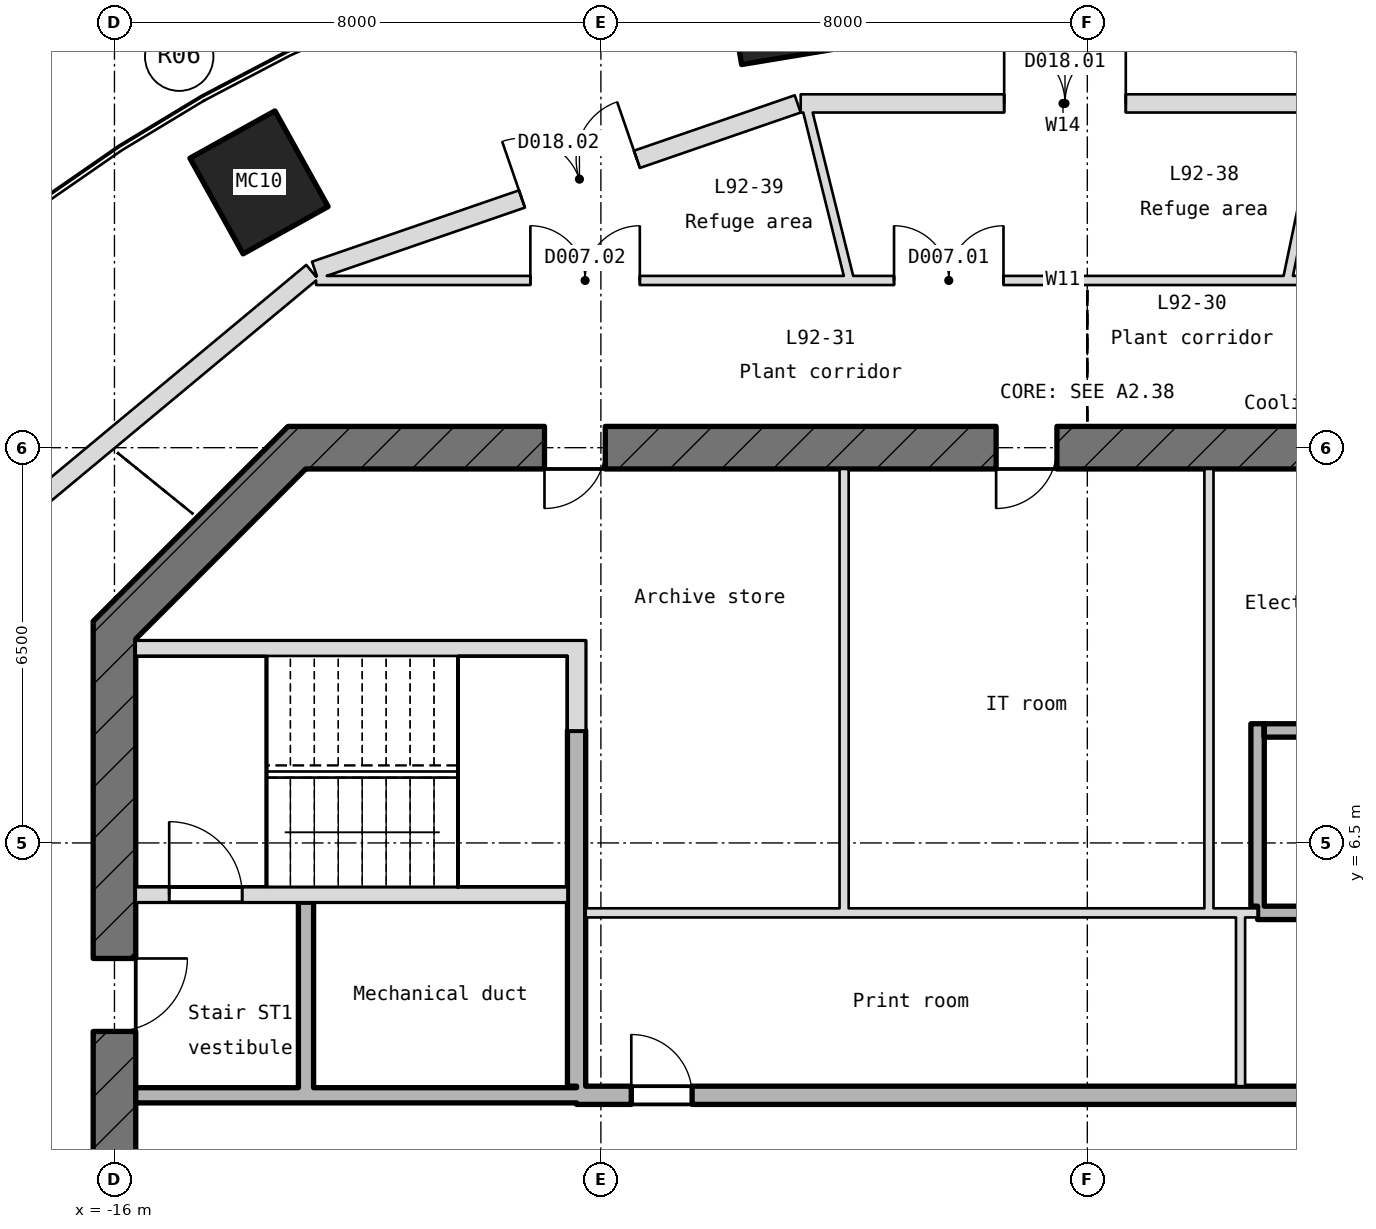
"""IFC4 building model, lengths in metres.
Left out: names, types, materials, properties, quantities, classifications, styles, units other than length and angle.
Written with IfcOpenShell. Run it as: python <this file> out.ifc"""

import sys

from ifc_helpers import new_model, si_unit, direction, frame, frame_2d, origin, place, context, subcontext, project, spatial, polyline, rectangle, outline, extrude, element, fill, save


model = new_model("IFC4")
c1 = context("Model", 3, precision=1e-05, world=origin(), true_north=direction((0.0, 1.0)))
c2 = subcontext(c1, "Body", "Model", "MODEL_VIEW")
j1 = project(units=[si_unit("LENGTHUNIT", "METRE"), si_unit("PLANEANGLEUNIT", "RADIAN")], contexts=[c1])
p1 = place(None, origin())
s1 = spatial("IfcSite", under=j1, at=p1, CompositionType="ELEMENT")
p2 = place(p1, origin())
s2 = spatial("IfcBuilding", under=s1, at=p2, CompositionType="ELEMENT")
p3 = place(p2, frame((0.0, 0.0, 407.55)))
s3 = spatial("IfcBuildingStorey", under=s2, at=p3, CompositionType="ELEMENT", Elevation=407.55)
p4 = place(p3, frame((0.0, 0.0, -0.3)))
e1 = element("IfcColumn", 1, at=p4, inside=s3, PredefinedType="COLUMN", context=c2, shape_type="SweptSolid", body=[
    extrude(outline(polyline([(4.799, 18.943), (3.221, 19.204), (3.515, 20.98), (3.601, 21.338), (5.179, 21.077), (4.885, 19.301), (4.799, 18.943)])), origin(), (0.0, 0.0, 1.0), 6.1),
])
p5 = place(p3, frame((0.0, 0.0, -0.3)))
e2 = element("IfcColumn", 2, at=p5, inside=s3, PredefinedType="COLUMN", context=c2, shape_type="SweptSolid", body=[
    extrude(outline(polyline([(-5.599, 18.943), (-5.685, 19.301), (-5.979, 21.077), (-4.401, 21.338), (-4.315, 20.98), (-4.021, 19.204), (-5.599, 18.943)])), origin(), (0.0, 0.0, 1.0), 6.1),
])
p6 = place(p3, frame((0.0, 0.0, -0.3)))
e3 = element("IfcColumn", 3, at=p6, inside=s3, PredefinedType="COLUMN", context=c2, shape_type="SweptSolid", body=[
    extrude(outline(polyline([(-13.639, 15.884), (-13.885, 16.188), (-14.759, 17.761), (-13.361, 18.538), (-13.115, 18.235), (-12.24, 16.662), (-13.639, 15.884)])), origin(), (0.0, 0.0, 1.0), 6.1),
])
p7 = place(p3, frame((13.145, 13.0, -0.3), z_axis=(0.0, 0.0, 1.0), x_axis=(-1.0, 0.0, 0.0)))
e4 = element("IfcWall", 4, at=p7, inside=s3, PredefinedType="SHEAR", context=c2, shape_type="SweptSolid", body=[
    extrude(rectangle(XDim=26.29, YDim=0.7, at=frame_2d((13.145, 0.0))), origin(), (0.0, 0.0, 1.0), 6.1),
])
p8 = place(p7, frame((21.073, 0.0, 0.3)))
e5 = element("IfcOpeningElement", 5, at=p8, cuts=e4, PredefinedType="OPENING", context=c2, shape_type="SweptSolid", body=[
    extrude(rectangle(XDim=1.0, YDim=2.1, at=frame_2d((0.5, 1.05))), frame((0.0, 0.36, 0.0), z_axis=(0.0, -1.0, 0.0), x_axis=(1.0, 0.0, 0.0)), (0.0, 0.0, 1.0), 0.72),
])
p9 = place(p7, frame((13.645, 0.0, 0.3)))
e6 = element("IfcOpeningElement", 6, at=p9, cuts=e4, PredefinedType="OPENING", context=c2, shape_type="SweptSolid", body=[
    extrude(rectangle(XDim=1.0, YDim=2.1, at=frame_2d((0.5, 1.05))), frame((0.0, 0.36, 0.0), z_axis=(0.0, -1.0, 0.0), x_axis=(1.0, 0.0, 0.0)), (0.0, 0.0, 1.0), 0.72),
])
p10 = place(p7, frame((7.395, 0.0, 0.3)))
e7 = element("IfcOpeningElement", 7, at=p10, cuts=e4, PredefinedType="OPENING", context=c2, shape_type="SweptSolid", body=[
    extrude(rectangle(XDim=1.0, YDim=2.1, at=frame_2d((0.5, 1.05))), frame((0.0, 0.36, 0.0), z_axis=(0.0, -1.0, 0.0), x_axis=(1.0, 0.0, 0.0)), (0.0, 0.0, 1.0), 0.72),
])
p11 = place(p7, frame((2.4, 0.0, 0.3)))
e8 = element("IfcOpeningElement", 8, at=p11, cuts=e4, PredefinedType="OPENING", context=c2, shape_type="SweptSolid", body=[
    extrude(rectangle(XDim=1.0, YDim=2.1, at=frame_2d((0.5, 1.05))), frame((0.0, 0.36, 0.0), z_axis=(0.0, -1.0, 0.0), x_axis=(1.0, 0.0, 0.0)), (0.0, 0.0, 1.0), 0.72),
])
p12 = place(p3, frame((-12.897, 13.103, -0.3), z_axis=(0.0, 0.0, 1.0), x_axis=(-0.707106781187, -0.707106781187, 0.0)))
e9 = element("IfcWall", 9, at=p12, inside=s3, PredefinedType="SHEAR", context=c2, shape_type="SweptSolid", body=[
    extrude(rectangle(XDim=4.533, YDim=0.7, at=frame_2d((2.266, 0.0))), origin(), (0.0, 0.0, 1.0), 6.1),
])
p13 = place(p3, frame((-16.0, 10.145, -0.3), z_axis=(0.0, 0.0, 1.0), x_axis=(0.0, -1.0, 0.0)))
e10 = element("IfcWall", 10, at=p13, inside=s3, PredefinedType="SHEAR", context=c2, shape_type="SweptSolid", body=[
    extrude(rectangle(XDim=20.29, YDim=0.7, at=frame_2d((10.145, 0.0))), origin(), (0.0, 0.0, 1.0), 6.1),
])
p14 = place(p13, frame((8.945, 0.0, 0.3)))
e11 = element("IfcOpeningElement", 11, at=p14, cuts=e10, PredefinedType="OPENING", context=c2, shape_type="SweptSolid", body=[
    extrude(rectangle(XDim=2.4, YDim=2.1, at=frame_2d((1.2, 1.05))), frame((0.0, 0.36, 0.0), z_axis=(0.0, -1.0, 0.0), x_axis=(1.0, 0.0, 0.0)), (0.0, 0.0, 1.0), 0.72),
])
p15 = place(p13, frame((5.545, 0.0, 0.3)))
e12 = element("IfcOpeningElement", 12, at=p15, cuts=e10, PredefinedType="OPENING", context=c2, shape_type="SweptSolid", body=[
    extrude(rectangle(XDim=1.2, YDim=2.1, at=frame_2d((0.6, 1.05))), frame((0.0, 0.36, 0.0), z_axis=(0.0, -1.0, 0.0), x_axis=(1.0, 0.0, 0.0)), (0.0, 0.0, 1.0), 0.72),
])
p16 = place(p3, frame((-15.65, 2.35, 0.0), z_axis=(0.0, 0.0, 1.0), x_axis=(1.0, 0.0, 0.0)))
e13 = element("IfcWall", 13, at=p16, inside=s3, PredefinedType="STANDARD", context=c2, shape_type="SweptSolid", body=[
    extrude(rectangle(XDim=7.25, YDim=0.25, at=frame_2d((3.625, 0.0))), origin(), (0.0, 0.0, 1.0), 5.8),
])
p17 = place(p3, frame((-8.4, 2.35, -0.3), z_axis=(0.0, 0.0, 1.0), x_axis=(1.0, 0.0, 0.0)))
e14 = element("IfcWall", 14, at=p17, inside=s3, PredefinedType="SHEAR", context=c2, shape_type="SweptSolid", body=[
    extrude(rectangle(XDim=16.8, YDim=0.3, at=frame_2d((8.4, 0.0))), origin(), (0.0, 0.0, 1.0), 6.1),
])
p18 = place(p17, frame((0.9, 0.0, 0.3)))
e15 = element("IfcOpeningElement", 15, at=p18, cuts=e14, PredefinedType="OPENING", context=c2, shape_type="SweptSolid", body=[
    extrude(rectangle(XDim=1.0, YDim=2.1, at=frame_2d((0.5, 1.05))), frame((0.0, 0.16, 0.0), z_axis=(0.0, -1.0, 0.0), x_axis=(1.0, 0.0, 0.0)), (0.0, 0.0, 1.0), 0.32),
])
p19 = place(p17, frame((14.9, 0.0, 0.3)))
e16 = element("IfcOpeningElement", 16, at=p19, cuts=e14, PredefinedType="OPENING", context=c2, shape_type="SweptSolid", body=[
    extrude(rectangle(XDim=1.0, YDim=2.1, at=frame_2d((0.5, 1.05))), frame((0.0, 0.16, 0.0), z_axis=(0.0, -1.0, 0.0), x_axis=(1.0, 0.0, 0.0)), (0.0, 0.0, 1.0), 0.32),
])
p20 = place(p3, frame((-8.25, 5.35, 0.0), z_axis=(0.0, 0.0, 1.0), x_axis=(1.0, 0.0, 0.0)))
e17 = element("IfcWall", 17, at=p20, inside=s3, PredefinedType="PARTITIONING", context=c2, shape_type="SweptSolid", body=[
    extrude(rectangle(XDim=11.05, YDim=0.15, at=frame_2d((5.525, 0.0))), origin(), (0.0, 0.0, 1.0), 5.8),
])
p21 = place(p3, frame((2.8, 5.35, 0.0), z_axis=(0.0, 0.0, 1.0), x_axis=(1.0, 0.0, 0.0)))
e18 = element("IfcWall", 18, at=p21, inside=s3, PredefinedType="STANDARD", context=c2, shape_type="SweptSolid", body=[
    extrude(rectangle(XDim=5.45, YDim=0.22, at=frame_2d((2.725, 0.0))), origin(), (0.0, 0.0, 1.0), 5.8),
])
p22 = place(p3, frame((-15.65, 5.65, -0.3), z_axis=(0.0, 0.0, 1.0), x_axis=(1.0, 0.0, 0.0)))
e19 = element("IfcWall", 19, at=p22, inside=s3, PredefinedType="SHEAR", context=c2, shape_type="SweptSolid", body=[
    extrude(rectangle(XDim=7.1, YDim=0.25, at=frame_2d((3.55, 0.0))), origin(), (0.0, 0.0, 1.0), 6.1),
])
p23 = place(p22, frame((0.55, 0.0, 0.3)))
e20 = element("IfcOpeningElement", 20, at=p23, cuts=e19, PredefinedType="OPENING", context=c2, shape_type="SweptSolid", body=[
    extrude(rectangle(XDim=1.2, YDim=2.1, at=frame_2d((0.6, 1.05))), frame((0.0, 0.135, 0.0), z_axis=(0.0, -1.0, 0.0), x_axis=(1.0, 0.0, 0.0)), (0.0, 0.0, 1.0), 0.27),
])
p24 = place(p3, frame((2.91, 8.35, 0.0), z_axis=(0.0, 0.0, 1.0), x_axis=(1.0, 0.0, 0.0)))
e21 = element("IfcWall", 21, at=p24, inside=s3, PredefinedType="STANDARD", context=c2, shape_type="SweptSolid", body=[
    extrude(rectangle(XDim=5.34, YDim=0.22, at=frame_2d((2.67, 0.0))), origin(), (0.0, 0.0, 1.0), 5.8),
])
p25 = place(p3, frame((-15.65, 9.7, -0.3), z_axis=(0.0, 0.0, 1.0), x_axis=(1.0, 0.0, 0.0)))
e22 = element("IfcWall", 22, at=p25, inside=s3, PredefinedType="SHEAR", context=c2, shape_type="SweptSolid", body=[
    extrude(rectangle(XDim=7.1, YDim=0.25, at=frame_2d((3.55, 0.0))), origin(), (0.0, 0.0, 1.0), 6.1),
])
p26 = place(p3, frame((-12.85, 2.475, 0.0), z_axis=(0.0, 0.0, 1.0), x_axis=(0.0, 1.0, 0.0)))
e23 = element("IfcWall", 23, at=p26, inside=s3, PredefinedType="STANDARD", context=c2, shape_type="SweptSolid", body=[
    extrude(rectangle(XDim=3.05, YDim=0.25, at=frame_2d((1.525, 0.0))), origin(), (0.0, 0.0, 1.0), 5.8),
])
p27 = place(p3, frame((-8.4, 2.5, -0.3), z_axis=(0.0, 0.0, 1.0), x_axis=(0.0, 1.0, 0.0)))
e24 = element("IfcWall", 24, at=p27, inside=s3, PredefinedType="SHEAR", context=c2, shape_type="SweptSolid", body=[
    extrude(rectangle(XDim=5.85, YDim=0.3, at=frame_2d((2.925, 0.0))), origin(), (0.0, 0.0, 1.0), 6.1),
])
p28 = place(p3, frame((-8.4, 8.35, -0.3), z_axis=(0.0, 0.0, 1.0), x_axis=(0.0, 1.0, 0.0)))
e25 = element("IfcWall", 25, at=p28, inside=s3, PredefinedType="SHEAR", context=c2, shape_type="SweptSolid", body=[
    extrude(rectangle(XDim=1.475, YDim=0.3, at=frame_2d((0.737, 0.0))), origin(), (0.0, 0.0, 1.0), 6.1),
])
for number, where, z_axis, x_axis in (
    (26, (-4.0, 5.425, 0.0), (0.0, 0.0, 1.0), (0.0, 1.0, 0.0)),
    (27, (2.0, 5.425, 0.0), (0.0, 0.0, 1.0), (0.0, 1.0, 0.0)),
):
    element("IfcWall", number, at=place(p3, frame(where, z_axis=z_axis, x_axis=x_axis)), inside=s3, PredefinedType="PARTITIONING", context=c2, shape_type="SweptSolid", body=[
        extrude(rectangle(XDim=7.225, YDim=0.15, at=frame_2d((3.612, 0.0))), origin(), (0.0, 0.0, 1.0), 5.8),
    ])
p29 = place(p3, frame((2.52, 2.5, 0.0), z_axis=(0.0, 0.0, 1.0), x_axis=(0.0, 1.0, 0.0)))
e28 = element("IfcWall", 28, at=p29, inside=s3, PredefinedType="PARTITIONING", context=c2, shape_type="SweptSolid", body=[
    extrude(rectangle(XDim=2.775, YDim=0.15, at=frame_2d((1.387, 0.0))), origin(), (0.0, 0.0, 1.0), 5.8),
])
p30 = place(p3, frame((2.8, 5.46, 0.0), z_axis=(0.0, 0.0, 1.0), x_axis=(0.0, 1.0, 0.0)))
e29 = element("IfcWall", 29, at=p30, inside=s3, PredefinedType="STANDARD", context=c2, shape_type="SweptSolid", body=[
    extrude(rectangle(XDim=3.0, YDim=0.22, at=frame_2d((1.5, 0.0))), origin(), (0.0, 0.0, 1.0), 5.8),
])
p31 = place(p3, frame((-4.714, 18.662, 0.0), z_axis=(0.0, 0.0, 1.0), x_axis=(1.0, 0.0, 0.0)))
e30 = element("IfcWall", 30, at=p31, inside=s3, PredefinedType="STANDARD", context=c2, shape_type="SweptSolid", body=[
    extrude(rectangle(XDim=8.628, YDim=0.3, at=frame_2d((4.314, 0.0))), origin(), (0.0, 0.0, 1.0), 5.8),
])
p32 = place(p31, frame((3.347, 0.0, 0.0)))
e31 = element("IfcOpeningElement", 31, at=p32, cuts=e30, PredefinedType="OPENING", context=c2, shape_type="SweptSolid", body=[
    extrude(rectangle(XDim=2.0, YDim=2.1, at=frame_2d((1.0, 1.05))), frame((0.0, 0.16, 0.0), z_axis=(0.0, -1.0, 0.0), x_axis=(1.0, 0.0, 0.0)), (0.0, 0.0, 1.0), 0.32),
])
p33 = place(p3, frame((-12.702, 15.917, 0.0), z_axis=(0.0, 0.0, 1.0), x_axis=(0.945424873084, 0.32584015921, 0.0)))
e32 = element("IfcWall", 32, at=p33, inside=s3, PredefinedType="STANDARD", context=c2, shape_type="SweptSolid", body=[
    extrude(rectangle(XDim=8.398, YDim=0.3, at=frame_2d((4.199, 0.0))), origin(), (0.0, 0.0, 1.0), 5.8),
])
p34 = place(p33, frame((3.601, 0.0, 0.0)))
e33 = element("IfcOpeningElement", 33, at=p34, cuts=e32, PredefinedType="OPENING", context=c2, shape_type="SweptSolid", body=[
    extrude(rectangle(XDim=2.0, YDim=2.1, at=frame_2d((1.0, 1.05))), frame((0.0, 0.16, 0.0), z_axis=(0.0, -1.0, 0.0), x_axis=(1.0, 0.0, 0.0)), (0.0, 0.0, 1.0), 0.32),
])
p35 = place(p3, frame((-18.755, 10.893, 0.0), z_axis=(0.0, 0.0, 1.0), x_axis=(0.768712832432, 0.639594075375, 0.0)))
e34 = element("IfcWall", 34, at=p35, inside=s3, PredefinedType="STANDARD", context=c2, shape_type="SweptSolid", body=[
    extrude(rectangle(XDim=7.813, YDim=0.3, at=frame_2d((3.906, 0.0))), origin(), (0.0, 0.0, 1.0), 5.8),
])
p36 = place(p3, frame((-12.684, 15.75, 0.0), z_axis=(0.0, 0.0, 1.0), x_axis=(1.0, 0.0, 0.0)))
e35 = element("IfcWall", 35, at=p36, inside=s3, PredefinedType="PARTITIONING", context=c2, shape_type="SweptSolid", body=[
    extrude(rectangle(XDim=24.568, YDim=0.15, at=frame_2d((12.284, 0.0))), origin(), (0.0, 0.0, 1.0), 5.8),
])
p37 = place(p36, frame((19.317, 0.0, 0.0)))
e36 = element("IfcOpeningElement", 36, at=p37, cuts=e35, PredefinedType="OPENING", context=c2, shape_type="SweptSolid", body=[
    extrude(rectangle(XDim=1.0, YDim=2.1, at=frame_2d((0.5, 1.05))), frame((0.0, 0.085, 0.0), z_axis=(0.0, -1.0, 0.0), x_axis=(1.0, 0.0, 0.0)), (0.0, 0.0, 1.0), 0.17),
])
p38 = place(p36, frame((9.505, 0.0, 0.0)))
e37 = element("IfcOpeningElement", 37, at=p38, cuts=e35, PredefinedType="OPENING", context=c2, shape_type="SweptSolid", body=[
    extrude(rectangle(XDim=1.8, YDim=2.1, at=frame_2d((0.9, 1.05))), frame((0.0, 0.085, 0.0), z_axis=(0.0, -1.0, 0.0), x_axis=(1.0, 0.0, 0.0)), (0.0, 0.0, 1.0), 0.17),
])
p39 = place(p36, frame((3.524, 0.0, 0.0)))
e38 = element("IfcOpeningElement", 38, at=p39, cuts=e35, PredefinedType="OPENING", context=c2, shape_type="SweptSolid", body=[
    extrude(rectangle(XDim=1.8, YDim=2.1, at=frame_2d((0.9, 1.05))), frame((0.0, 0.085, 0.0), z_axis=(0.0, -1.0, 0.0), x_axis=(1.0, 0.0, 0.0)), (0.0, 0.0, 1.0), 0.17),
])
p40 = place(p3, frame((3.289, 15.75, 0.0), z_axis=(0.0, 0.0, 1.0), x_axis=(0.204458992869, 0.978875130052, 0.0)))
e39 = element("IfcWall", 39, at=p40, inside=s3, PredefinedType="PARTITIONING", context=c2, shape_type="SweptSolid", body=[
    extrude(rectangle(XDim=2.974, YDim=0.15, at=frame_2d((1.487, 0.0))), origin(), (0.0, 0.0, 1.0), 5.447),
])
p41 = place(p3, frame((-3.909, 15.75, 0.0), z_axis=(0.0, 0.0, 1.0), x_axis=(-0.240888502077, 0.970552795868, 0.0)))
e40 = element("IfcWall", 40, at=p41, inside=s3, PredefinedType="PARTITIONING", context=c2, shape_type="SweptSolid", body=[
    extrude(rectangle(XDim=3.0, YDim=0.15, at=frame_2d((1.5, 0.0))), origin(), (0.0, 0.0, 1.0), 5.447),
])
p42 = place(p23, origin())
e41 = element("IfcDoor", 41, at=p42, inside=s3, OperationType="SINGLE_SWING_RIGHT", PredefinedType="DOOR", context=c2, shape_type="SweptSolid", body=[
    extrude(rectangle(XDim=1.2, YDim=2.1, at=frame_2d((0.6, 1.05))), frame((0.0, 0.025, 0.0), z_axis=(0.0, -1.0, 0.0), x_axis=(1.0, 0.0, 0.0)), (0.0, 0.0, 1.0), 0.05),
])
fill(e20, e41)
p43 = place(p15, origin())
e42 = element("IfcDoor", 42, at=p43, inside=s3, OperationType="SINGLE_SWING_RIGHT", PredefinedType="DOOR", context=c2, shape_type="SweptSolid", body=[
    extrude(rectangle(XDim=1.2, YDim=2.1, at=frame_2d((0.6, 1.05))), frame((0.0, 0.025, 0.0), z_axis=(0.0, -1.0, 0.0), x_axis=(1.0, 0.0, 0.0)), (0.0, 0.0, 1.0), 0.05),
])
fill(e12, e42)
p44 = place(p18, origin())
e43 = element("IfcDoor", 43, at=p44, inside=s3, OperationType="SINGLE_SWING_RIGHT", PredefinedType="DOOR", context=c2, shape_type="SweptSolid", body=[
    extrude(rectangle(XDim=1.0, YDim=2.1, at=frame_2d((0.5, 1.05))), frame((0.0, 0.025, 0.0), z_axis=(0.0, -1.0, 0.0), x_axis=(1.0, 0.0, 0.0)), (0.0, 0.0, 1.0), 0.05),
])
fill(e15, e43)
p45 = place(p8, origin())
e44 = element("IfcDoor", 44, at=p45, inside=s3, OperationType="SINGLE_SWING_RIGHT", PredefinedType="DOOR", context=c2, shape_type="SweptSolid", body=[
    extrude(rectangle(XDim=1.0, YDim=2.1, at=frame_2d((0.5, 1.05))), frame((0.0, 0.025, 0.0), z_axis=(0.0, -1.0, 0.0), x_axis=(1.0, 0.0, 0.0)), (0.0, 0.0, 1.0), 0.05),
])
fill(e5, e44)
p46 = place(p9, origin())
e45 = element("IfcDoor", 45, at=p46, inside=s3, OperationType="SINGLE_SWING_RIGHT", PredefinedType="DOOR", context=c2, shape_type="SweptSolid", body=[
    extrude(rectangle(XDim=1.0, YDim=2.1, at=frame_2d((0.5, 1.05))), frame((0.0, 0.025, 0.0), z_axis=(0.0, -1.0, 0.0), x_axis=(1.0, 0.0, 0.0)), (0.0, 0.0, 1.0), 0.05),
])
fill(e6, e45)
p47 = place(p38, origin())
e46 = element("IfcDoor", 46, at=p47, inside=s3, OperationType="DOUBLE_DOOR_SINGLE_SWING", PredefinedType="DOOR", context=c2, shape_type="SweptSolid", body=[
    extrude(rectangle(XDim=1.8, YDim=2.1, at=frame_2d((0.9, 1.05))), frame((0.0, 0.025, 0.0), z_axis=(0.0, -1.0, 0.0), x_axis=(1.0, 0.0, 0.0)), (0.0, 0.0, 1.0), 0.05),
])
fill(e37, e46)
p48 = place(p32, origin())
e47 = element("IfcDoor", 47, at=p48, inside=s3, OperationType="DOUBLE_DOOR_SINGLE_SWING", PredefinedType="DOOR", context=c2, shape_type="SweptSolid", body=[
    extrude(rectangle(XDim=2.0, YDim=2.1, at=frame_2d((1.0, 1.05))), frame((0.0, 0.025, 0.0), z_axis=(0.0, -1.0, 0.0), x_axis=(1.0, 0.0, 0.0)), (0.0, 0.0, 1.0), 0.05),
])
fill(e31, e47)
p49 = place(p39, origin())
e48 = element("IfcDoor", 48, at=p49, inside=s3, OperationType="DOUBLE_DOOR_SINGLE_SWING", PredefinedType="DOOR", context=c2, shape_type="SweptSolid", body=[
    extrude(rectangle(XDim=1.8, YDim=2.1, at=frame_2d((0.9, 1.05))), frame((0.0, 0.025, 0.0), z_axis=(0.0, -1.0, 0.0), x_axis=(1.0, 0.0, 0.0)), (0.0, 0.0, 1.0), 0.05),
])
fill(e38, e48)
p50 = place(p34, origin())
e49 = element("IfcDoor", 49, at=p50, inside=s3, OperationType="DOUBLE_DOOR_SINGLE_SWING", PredefinedType="DOOR", context=c2, shape_type="SweptSolid", body=[
    extrude(rectangle(XDim=2.0, YDim=2.1, at=frame_2d((1.0, 1.05))), frame((0.0, 0.025, 0.0), z_axis=(0.0, -1.0, 0.0), x_axis=(1.0, 0.0, 0.0)), (0.0, 0.0, 1.0), 0.05),
])
fill(e33, e49)
save(model, sys.argv[1])
